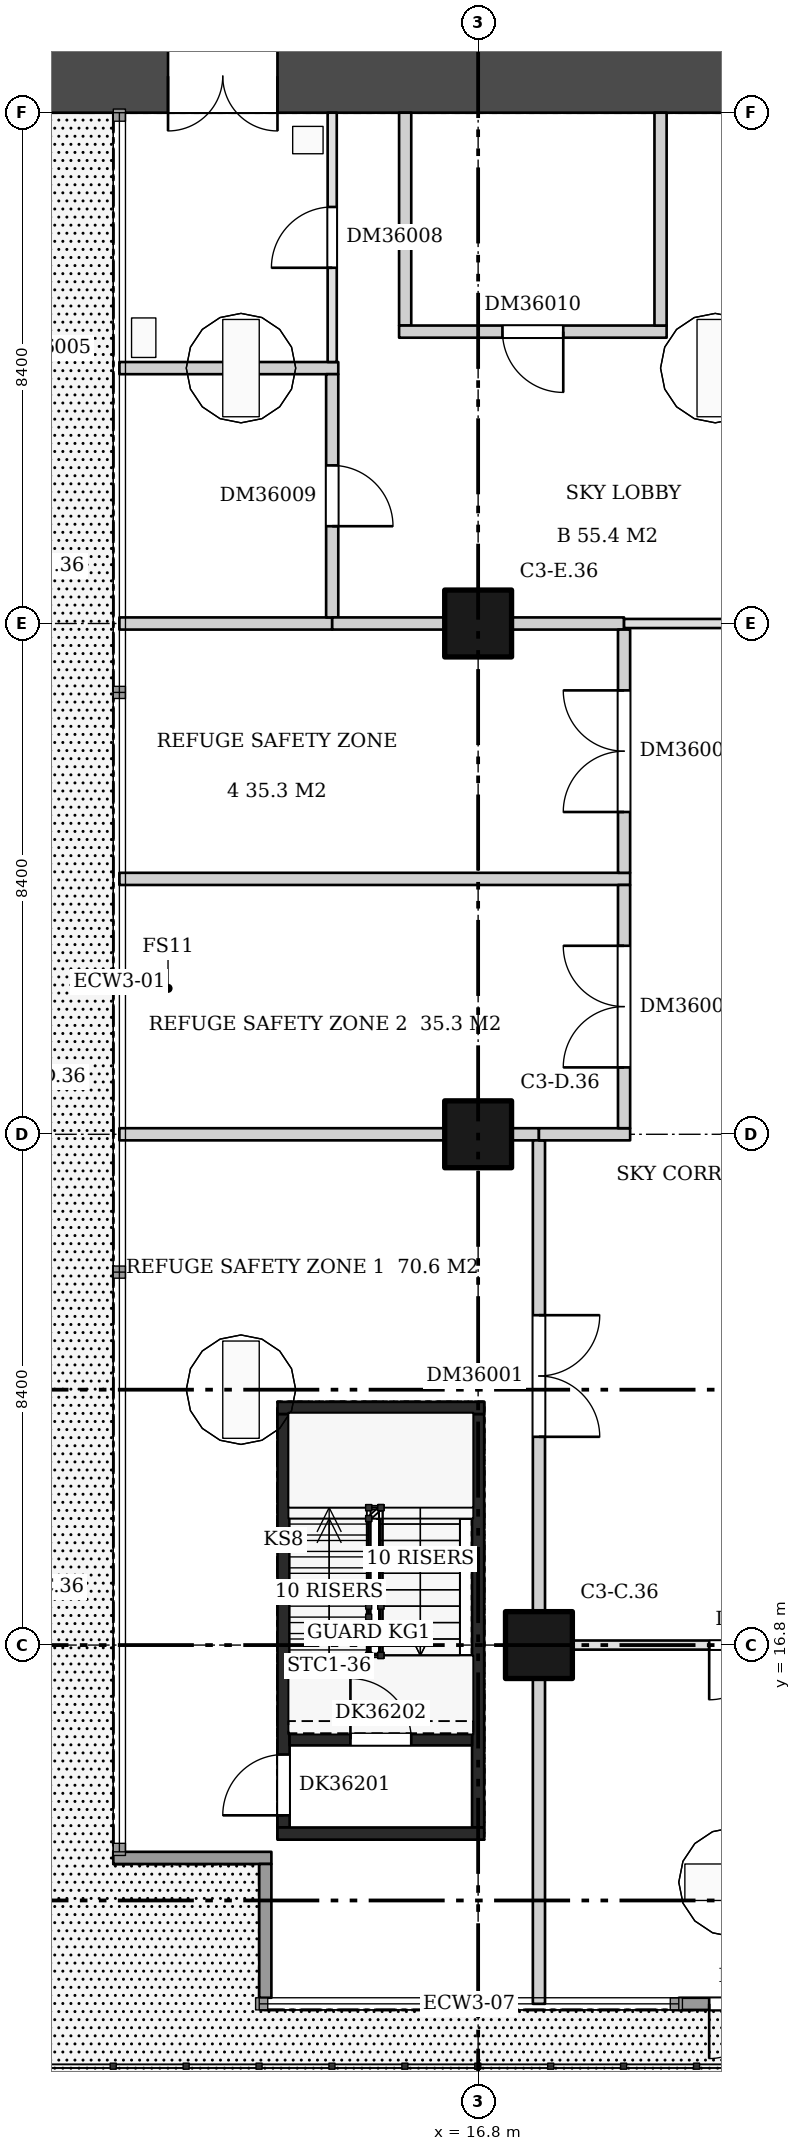
"""IFC4 building model, lengths in metres.
Left out: names, types, materials, properties, quantities, classifications, styles, units other than length and angle.
Written with IfcOpenShell. Run it as: python <this file> out.ifc"""

import sys

from ifc_helpers import new_model, si_unit, direction, frame, frame_2d, origin, origin_2d, place, context, subcontext, project, spatial, rectangle, extrude, element, fill, save


model = new_model("IFC4")
c1 = context("Model", 3, precision=1e-05, world=origin(), true_north=direction((0.0, 1.0)))
c2 = subcontext(c1, "Body", "Model", "MODEL_VIEW")
j1 = project(units=[si_unit("LENGTHUNIT", "METRE"), si_unit("PLANEANGLEUNIT", "RADIAN")], contexts=[c1])
p1 = place(None, origin())
s1 = spatial("IfcSite", under=j1, at=p1, CompositionType="ELEMENT")
p2 = place(p1, origin())
s2 = spatial("IfcBuilding", under=s1, at=p2, CompositionType="ELEMENT")
p3 = place(p2, frame((0.0, 0.0, 140.7)))
s3 = spatial("IfcBuildingStorey", under=s2, at=p3, CompositionType="ELEMENT", Elevation=140.7)
for number, where, z_axis, x_axis in (
    (1, (17.8, 16.8, 0.0), (0.0, 0.0, 1.0), (1.0, 0.0, 0.0)),
    (2, (16.8, 25.2, 0.0), (0.0, 0.0, 1.0), (1.0, 0.0, 0.0)),
    (3, (16.8, 33.6, 0.0), (0.0, 0.0, 1.0), (1.0, 0.0, 0.0)),
):
    element("IfcColumn", number, at=place(p3, frame(where, z_axis=z_axis, x_axis=x_axis)), inside=s3, PredefinedType="COLUMN", context=c2, shape_type="SweptSolid", body=[
        extrude(rectangle(XDim=1.1, YDim=1.1, at=origin_2d()), origin(), (0.0, 0.0, 1.0), 6.72),
    ])
p4 = place(p3, frame((9.6, 42.6, 0.0), z_axis=(0.0, 0.0, 1.0), x_axis=(1.0, 0.0, 0.0)))
e4 = element("IfcWall", 4, at=p4, inside=s3, PredefinedType="SHEAR", context=c2, shape_type="SweptSolid", body=[
    extrude(rectangle(XDim=14.4, YDim=1.2, at=frame_2d((7.2, 0.0))), origin(), (0.0, 0.0, 1.0), 6.72),
])
p5 = place(p4, frame((2.1, 0.0, 0.0)))
e5 = element("IfcOpeningElement", 5, at=p5, cuts=e4, PredefinedType="OPENING", context=c2, shape_type="SweptSolid", body=[
    extrude(rectangle(XDim=1.8, YDim=2.1, at=frame_2d((0.9, 1.05))), frame((0.0, 0.61, 0.0), z_axis=(0.0, -1.0, 0.0), x_axis=(1.0, 0.0, 0.0)), (0.0, 0.0, 1.0), 1.22),
])
p6 = place(p3, frame((13.6, 13.8, 0.0), z_axis=(0.0, 0.0, 1.0), x_axis=(0.0, 1.0, 0.0)))
e6 = element("IfcWall", 6, at=p6, inside=s3, PredefinedType="SHEAR", context=c2, shape_type="SweptSolid", body=[
    extrude(rectangle(XDim=6.8, YDim=0.2, at=frame_2d((3.4, 0.0))), origin(), (0.0, 0.0, 1.0), 6.72),
])
p7 = place(p6, frame((0.2, 0.0, 0.0)))
e7 = element("IfcOpeningElement", 7, at=p7, cuts=e6, PredefinedType="OPENING", context=c2, shape_type="SweptSolid", body=[
    extrude(rectangle(XDim=1.0, YDim=2.1, at=frame_2d((0.5, 1.05))), frame((0.0, 0.11, 0.0), z_axis=(0.0, -1.0, 0.0), x_axis=(1.0, 0.0, 0.0)), (0.0, 0.0, 1.0), 0.22),
])
p8 = place(p3, frame((16.8, 13.8, 0.0), z_axis=(0.0, 0.0, 1.0), x_axis=(0.0, 1.0, 0.0)))
e8 = element("IfcWall", 8, at=p8, inside=s3, PredefinedType="SHEAR", context=c2, shape_type="SweptSolid", body=[
    extrude(rectangle(XDim=6.8, YDim=0.2, at=frame_2d((3.4, 0.0))), origin(), (0.0, 0.0, 1.0), 6.72),
])
for number, where, z_axis, x_axis in (
    (9, (13.5, 13.7, 0.0), (0.0, 0.0, 1.0), (1.0, 0.0, 0.0)),
    (10, (13.5, 20.7, 0.0), (0.0, 0.0, 1.0), (1.0, 0.0, 0.0)),
):
    element("IfcWall", number, at=place(p3, frame(where, z_axis=z_axis, x_axis=x_axis)), inside=s3, PredefinedType="SHEAR", context=c2, shape_type="SweptSolid", body=[
        extrude(rectangle(XDim=3.4, YDim=0.2, at=frame_2d((1.7, 0.0))), origin(), (0.0, 0.0, 1.0), 6.72),
    ])
p9 = place(p3, frame((13.7, 15.25, 0.0), z_axis=(0.0, 0.0, 1.0), x_axis=(1.0, 0.0, 0.0)))
e11 = element("IfcWall", 11, at=p9, inside=s3, PredefinedType="SHEAR", context=c2, shape_type="SweptSolid", body=[
    extrude(rectangle(XDim=3.0, YDim=0.2, at=frame_2d((1.5, 0.0))), origin(), (0.0, 0.0, 1.0), 6.72),
])
p10 = place(p9, frame((1.0, 0.0, 0.0)))
e12 = element("IfcOpeningElement", 12, at=p10, cuts=e11, PredefinedType="OPENING", context=c2, shape_type="SweptSolid", body=[
    extrude(rectangle(XDim=1.0, YDim=2.1, at=frame_2d((0.5, 1.05))), frame((0.0, 0.11, 0.0), z_axis=(0.0, -1.0, 0.0), x_axis=(1.0, 0.0, 0.0)), (0.0, 0.0, 1.0), 0.22),
])
p11 = place(p3, frame((10.9, 25.2, 0.0), z_axis=(0.0, 0.0, 1.0), x_axis=(1.0, 0.0, 0.0)))
e13 = element("IfcWall", 13, at=p11, inside=s3, PredefinedType="PARTITIONING", context=c2, shape_type="SweptSolid", body=[
    extrude(rectangle(XDim=5.35, YDim=0.2, at=frame_2d((2.675, 0.0))), origin(), (0.0, 0.0, 1.0), 6.72),
])
p12 = place(p3, frame((17.35, 25.2, 0.0), z_axis=(0.0, 0.0, 1.0), x_axis=(1.0, 0.0, 0.0)))
e14 = element("IfcWall", 14, at=p12, inside=s3, PredefinedType="PARTITIONING", context=c2, shape_type="SweptSolid", body=[
    extrude(rectangle(XDim=0.45, YDim=0.2, at=frame_2d((0.225, 0.0))), origin(), (0.0, 0.0, 1.0), 6.72),
])
p13 = place(p3, frame((10.9, 29.4, 0.0), z_axis=(0.0, 0.0, 1.0), x_axis=(1.0, 0.0, 0.0)))
e15 = element("IfcWall", 15, at=p13, inside=s3, PredefinedType="PARTITIONING", context=c2, shape_type="SweptSolid", body=[
    extrude(rectangle(XDim=8.4, YDim=0.2, at=frame_2d((4.2, 0.0))), origin(), (0.0, 0.0, 1.0), 6.72),
])
p14 = place(p3, frame((10.9, 33.6, 0.0), z_axis=(0.0, 0.0, 1.0), x_axis=(1.0, 0.0, 0.0)))
e16 = element("IfcWall", 16, at=p14, inside=s3, PredefinedType="PARTITIONING", context=c2, shape_type="SweptSolid", body=[
    extrude(rectangle(XDim=3.5, YDim=0.2, at=frame_2d((1.75, 0.0))), origin(), (0.0, 0.0, 1.0), 6.72),
])
p15 = place(p3, frame((10.9, 37.8, 0.0), z_axis=(0.0, 0.0, 1.0), x_axis=(1.0, 0.0, 0.0)))
e17 = element("IfcWall", 17, at=p15, inside=s3, PredefinedType="PARTITIONING", context=c2, shape_type="SweptSolid", body=[
    extrude(rectangle(XDim=3.6, YDim=0.2, at=frame_2d((1.8, 0.0))), origin(), (0.0, 0.0, 1.0), 6.72),
])
p16 = place(p3, frame((14.4, 33.7, 0.0), z_axis=(0.0, 0.0, 1.0), x_axis=(0.0, 1.0, 0.0)))
e18 = element("IfcWall", 18, at=p16, inside=s3, PredefinedType="PARTITIONING", context=c2, shape_type="SweptSolid", body=[
    extrude(rectangle(XDim=4.0, YDim=0.2, at=frame_2d((2.0, 0.0))), origin(), (0.0, 0.0, 1.0), 6.72),
])
p17 = place(p16, frame((1.5, 0.0, 0.0)))
e19 = element("IfcOpeningElement", 19, at=p17, cuts=e18, PredefinedType="OPENING", context=c2, shape_type="SweptSolid", body=[
    extrude(rectangle(XDim=1.0, YDim=2.1, at=frame_2d((0.5, 1.05))), frame((0.0, 0.11, 0.0), z_axis=(0.0, -1.0, 0.0), x_axis=(1.0, 0.0, 0.0)), (0.0, 0.0, 1.0), 0.22),
])
p18 = place(p3, frame((14.4, 33.6, 0.0), z_axis=(0.0, 0.0, 1.0), x_axis=(1.0, 0.0, 0.0)))
e20 = element("IfcWall", 20, at=p18, inside=s3, PredefinedType="PARTITIONING", context=c2, shape_type="SweptSolid", body=[
    extrude(rectangle(XDim=1.85, YDim=0.2, at=frame_2d((0.925, 0.0))), origin(), (0.0, 0.0, 1.0), 6.72),
])
p19 = place(p3, frame((17.35, 33.6, 0.0), z_axis=(0.0, 0.0, 1.0), x_axis=(1.0, 0.0, 0.0)))
e21 = element("IfcWall", 21, at=p19, inside=s3, PredefinedType="PARTITIONING", context=c2, shape_type="SweptSolid", body=[
    extrude(rectangle(XDim=1.85, YDim=0.2, at=frame_2d((0.925, 0.0))), origin(), (0.0, 0.0, 1.0), 6.72),
])
p20 = place(p3, frame((14.4, 37.9, 0.0), z_axis=(0.0, 0.0, 1.0), x_axis=(0.0, 1.0, 0.0)))
e22 = element("IfcWall", 22, at=p20, inside=s3, PredefinedType="PARTITIONING", context=c2, shape_type="SweptSolid", body=[
    extrude(rectangle(XDim=4.1, YDim=0.15, at=frame_2d((2.05, 0.0))), origin(), (0.0, 0.0, 1.0), 6.72),
])
p21 = place(p20, frame((1.55, 0.0, 0.0)))
e23 = element("IfcOpeningElement", 23, at=p21, cuts=e22, PredefinedType="OPENING", context=c2, shape_type="SweptSolid", body=[
    extrude(rectangle(XDim=1.0, YDim=2.1, at=frame_2d((0.5, 1.05))), frame((0.0, 0.085, 0.0), z_axis=(0.0, -1.0, 0.0), x_axis=(1.0, 0.0, 0.0)), (0.0, 0.0, 1.0), 0.17),
])
p22 = place(p3, frame((15.6, 38.5, 0.0), z_axis=(0.0, 0.0, 1.0), x_axis=(0.0, 1.0, 0.0)))
e24 = element("IfcWall", 24, at=p22, inside=s3, PredefinedType="PARTITIONING", context=c2, shape_type="SweptSolid", body=[
    extrude(rectangle(XDim=3.5, YDim=0.2, at=frame_2d((1.75, 0.0))), origin(), (0.0, 0.0, 1.0), 6.72),
])
p23 = place(p3, frame((15.5, 38.4, 0.0), z_axis=(0.0, 0.0, 1.0), x_axis=(1.0, 0.0, 0.0)))
e25 = element("IfcWall", 25, at=p23, inside=s3, PredefinedType="PARTITIONING", context=c2, shape_type="SweptSolid", body=[
    extrude(rectangle(XDim=4.4, YDim=0.2, at=frame_2d((2.2, 0.0))), origin(), (0.0, 0.0, 1.0), 6.72),
])
p24 = place(p23, frame((1.7, 0.0, 0.0)))
e26 = element("IfcOpeningElement", 26, at=p24, cuts=e25, PredefinedType="OPENING", context=c2, shape_type="SweptSolid", body=[
    extrude(rectangle(XDim=1.0, YDim=2.1, at=frame_2d((0.5, 1.05))), frame((0.0, 0.11, 0.0), z_axis=(0.0, -1.0, 0.0), x_axis=(1.0, 0.0, 0.0)), (0.0, 0.0, 1.0), 0.22),
])
p25 = place(p3, frame((17.8, 10.9, 0.0), z_axis=(0.0, 0.0, 1.0), x_axis=(0.0, 1.0, 0.0)))
e27 = element("IfcWall", 27, at=p25, inside=s3, PredefinedType="PARTITIONING", context=c2, shape_type="SweptSolid", body=[
    extrude(rectangle(XDim=5.35, YDim=0.2, at=frame_2d((2.675, 0.0))), origin(), (0.0, 0.0, 1.0), 6.72),
])
p26 = place(p3, frame((17.8, 17.35, 0.0), z_axis=(0.0, 0.0, 1.0), x_axis=(0.0, 1.0, 0.0)))
e28 = element("IfcWall", 28, at=p26, inside=s3, PredefinedType="PARTITIONING", context=c2, shape_type="SweptSolid", body=[
    extrude(rectangle(XDim=7.75, YDim=0.2, at=frame_2d((3.875, 0.0))), origin(), (0.0, 0.0, 1.0), 6.72),
])
p27 = place(p26, frame((2.875, 0.0, 0.0)))
e29 = element("IfcOpeningElement", 29, at=p27, cuts=e28, PredefinedType="OPENING", context=c2, shape_type="SweptSolid", body=[
    extrude(rectangle(XDim=2.0, YDim=2.1, at=frame_2d((1.0, 1.05))), frame((0.0, 0.11, 0.0), z_axis=(0.0, -1.0, 0.0), x_axis=(1.0, 0.0, 0.0)), (0.0, 0.0, 1.0), 0.22),
])
p28 = place(p3, frame((18.35, 16.8, 0.0), z_axis=(0.0, 0.0, 1.0), x_axis=(1.0, 0.0, 0.0)))
e30 = element("IfcWall", 30, at=p28, inside=s3, PredefinedType="PARTITIONING", context=c2, shape_type="SweptSolid", body=[
    extrude(rectangle(XDim=6.3, YDim=0.15, at=frame_2d((3.15, 0.0))), origin(), (0.0, 0.0, 1.0), 6.72),
])
p29 = place(p28, frame((2.25, 0.0, 0.0)))
e31 = element("IfcOpeningElement", 31, at=p29, cuts=e30, PredefinedType="OPENING", context=c2, shape_type="SweptSolid", body=[
    extrude(rectangle(XDim=1.8, YDim=2.1, at=frame_2d((0.9, 1.05))), frame((0.0, 0.085, 0.0), z_axis=(0.0, -1.0, 0.0), x_axis=(1.0, 0.0, 0.0)), (0.0, 0.0, 1.0), 0.17),
])
p30 = place(p3, frame((17.8, 25.2, 0.0), z_axis=(0.0, 0.0, 1.0), x_axis=(1.0, 0.0, 0.0)))
e32 = element("IfcWall", 32, at=p30, inside=s3, PredefinedType="PARTITIONING", context=c2, shape_type="SweptSolid", body=[
    extrude(rectangle(XDim=1.5, YDim=0.2, at=frame_2d((0.75, 0.0))), origin(), (0.0, 0.0, 1.0), 6.72),
])
p31 = place(p3, frame((19.2, 25.3, 0.0), z_axis=(0.0, 0.0, 1.0), x_axis=(0.0, 1.0, 0.0)))
e33 = element("IfcWall", 33, at=p31, inside=s3, PredefinedType="PARTITIONING", context=c2, shape_type="SweptSolid", body=[
    extrude(rectangle(XDim=4.0, YDim=0.2, at=frame_2d((2.0, 0.0))), origin(), (0.0, 0.0, 1.0), 6.72),
])
p32 = place(p31, frame((1.0, 0.0, 0.0)))
e34 = element("IfcOpeningElement", 34, at=p32, cuts=e33, PredefinedType="OPENING", context=c2, shape_type="SweptSolid", body=[
    extrude(rectangle(XDim=2.0, YDim=2.1, at=frame_2d((1.0, 1.05))), frame((0.0, 0.11, 0.0), z_axis=(0.0, -1.0, 0.0), x_axis=(1.0, 0.0, 0.0)), (0.0, 0.0, 1.0), 0.22),
])
p33 = place(p3, frame((19.2, 29.5, 0.0), z_axis=(0.0, 0.0, 1.0), x_axis=(0.0, 1.0, 0.0)))
e35 = element("IfcWall", 35, at=p33, inside=s3, PredefinedType="PARTITIONING", context=c2, shape_type="SweptSolid", body=[
    extrude(rectangle(XDim=4.0, YDim=0.2, at=frame_2d((2.0, 0.0))), origin(), (0.0, 0.0, 1.0), 6.72),
])
p34 = place(p33, frame((1.0, 0.0, 0.0)))
e36 = element("IfcOpeningElement", 36, at=p34, cuts=e35, PredefinedType="OPENING", context=c2, shape_type="SweptSolid", body=[
    extrude(rectangle(XDim=2.0, YDim=2.1, at=frame_2d((1.0, 1.05))), frame((0.0, 0.11, 0.0), z_axis=(0.0, -1.0, 0.0), x_axis=(1.0, 0.0, 0.0)), (0.0, 0.0, 1.0), 0.22),
])
p35 = place(p3, frame((19.2, 33.6, 0.0), z_axis=(0.0, 0.0, 1.0), x_axis=(1.0, 0.0, 0.0)))
e37 = element("IfcWall", 37, at=p35, inside=s3, PredefinedType="PARTITIONING", context=c2, shape_type="SweptSolid", body=[
    extrude(rectangle(XDim=3.5, YDim=0.15, at=frame_2d((1.75, 0.0))), origin(), (0.0, 0.0, 1.0), 6.72),
])
p36 = place(p3, frame((19.8, 38.5, 0.0), z_axis=(0.0, 0.0, 1.0), x_axis=(0.0, 1.0, 0.0)))
e38 = element("IfcWall", 38, at=p36, inside=s3, PredefinedType="PARTITIONING", context=c2, shape_type="SweptSolid", body=[
    extrude(rectangle(XDim=3.5, YDim=0.2, at=frame_2d((1.75, 0.0))), origin(), (0.0, 0.0, 1.0), 6.72),
])
p37 = place(p3, frame((10.8, 13.3, 0.0), z_axis=(0.0, 0.0, 1.0), x_axis=(1.0, 0.0, 0.0)))
e39 = element("IfcWall", 39, at=p37, inside=s3, PredefinedType="SOLIDWALL", context=c2, shape_type="SweptSolid", body=[
    extrude(rectangle(XDim=2.6, YDim=0.2, at=frame_2d((1.3, 0.0))), origin(), (0.0, 0.0, 1.0), 6.72),
])
p38 = place(p3, frame((13.3, 13.2, 0.0), z_axis=(0.0, 0.0, 1.0), x_axis=(0.0, -1.0, 0.0)))
e40 = element("IfcWall", 40, at=p38, inside=s3, PredefinedType="SOLIDWALL", context=c2, shape_type="SweptSolid", body=[
    extrude(rectangle(XDim=2.2, YDim=0.2, at=frame_2d((1.1, 0.0))), origin(), (0.0, 0.0, 1.0), 6.72),
])
p39 = place(p3, frame((20.1, 10.9, 0.0), z_axis=(0.0, 0.0, 1.0), x_axis=(1.0, 0.0, 0.0)))
e41 = element("IfcWall", 41, at=p39, inside=s3, PredefinedType="SOLIDWALL", context=c2, shape_type="SweptSolid", body=[
    extrude(rectangle(XDim=2.8, YDim=0.2, at=frame_2d((1.4, 0.0))), origin(), (0.0, 0.0, 1.0), 6.72),
])
p40 = place(p39, frame((0.5, 0.0, 0.0)))
e42 = element("IfcOpeningElement", 42, at=p40, cuts=e41, PredefinedType="OPENING", context=c2, shape_type="SweptSolid", body=[
    extrude(rectangle(XDim=1.8, YDim=2.4, at=frame_2d((0.9, 1.2))), frame((0.0, 0.11, 0.0), z_axis=(0.0, -1.0, 0.0), x_axis=(1.0, 0.0, 0.0)), (0.0, 0.0, 1.0), 0.22),
])
p41 = place(p5, frame((1.8, 0.0, 0.0), z_axis=(0.0, 0.0, 1.0), x_axis=(-1.0, 0.0, 0.0)))
e43 = element("IfcDoor", 43, at=p41, inside=s3, OperationType="DOUBLE_DOOR_SINGLE_SWING", PredefinedType="DOOR", context=c2, shape_type="SweptSolid", body=[
    extrude(rectangle(XDim=1.8, YDim=2.1, at=frame_2d((0.9, 1.05))), frame((0.0, 0.025, 0.0), z_axis=(0.0, -1.0, 0.0), x_axis=(1.0, 0.0, 0.0)), (0.0, 0.0, 1.0), 0.05),
])
fill(e5, e43)
p42 = place(p7, origin())
e44 = element("IfcDoor", 44, at=p42, inside=s3, OperationType="SINGLE_SWING_LEFT", PredefinedType="DOOR", context=c2, shape_type="SweptSolid", body=[
    extrude(rectangle(XDim=1.0, YDim=2.1, at=frame_2d((0.5, 1.05))), frame((0.0, 0.025, 0.0), z_axis=(0.0, -1.0, 0.0), x_axis=(1.0, 0.0, 0.0)), (0.0, 0.0, 1.0), 0.05),
])
fill(e7, e44)
p43 = place(p10, origin())
e45 = element("IfcDoor", 45, at=p43, inside=s3, OperationType="SINGLE_SWING_LEFT", PredefinedType="DOOR", context=c2, shape_type="SweptSolid", body=[
    extrude(rectangle(XDim=1.0, YDim=2.1, at=frame_2d((0.5, 1.05))), frame((0.0, 0.025, 0.0), z_axis=(0.0, -1.0, 0.0), x_axis=(1.0, 0.0, 0.0)), (0.0, 0.0, 1.0), 0.05),
])
fill(e12, e45)
p44 = place(p27, frame((2.0, 0.0, 0.0), z_axis=(0.0, 0.0, 1.0), x_axis=(-1.0, 0.0, 0.0)))
e46 = element("IfcDoor", 46, at=p44, inside=s3, OperationType="DOUBLE_DOOR_SINGLE_SWING", PredefinedType="DOOR", context=c2, shape_type="SweptSolid", body=[
    extrude(rectangle(XDim=2.0, YDim=2.1, at=frame_2d((1.0, 1.05))), frame((0.0, 0.025, 0.0), z_axis=(0.0, -1.0, 0.0), x_axis=(1.0, 0.0, 0.0)), (0.0, 0.0, 1.0), 0.05),
])
fill(e29, e46)
p45 = place(p29, frame((1.8, 0.0, 0.0), z_axis=(0.0, 0.0, 1.0), x_axis=(-1.0, 0.0, 0.0)))
e47 = element("IfcDoor", 47, at=p45, inside=s3, OperationType="DOUBLE_DOOR_SINGLE_SWING", PredefinedType="DOOR", context=c2, shape_type="SweptSolid", body=[
    extrude(rectangle(XDim=1.8, YDim=2.1, at=frame_2d((0.9, 1.05))), frame((0.0, 0.025, 0.0), z_axis=(0.0, -1.0, 0.0), x_axis=(1.0, 0.0, 0.0)), (0.0, 0.0, 1.0), 0.05),
])
fill(e31, e47)
p46 = place(p32, origin())
e48 = element("IfcDoor", 48, at=p46, inside=s3, OperationType="DOUBLE_DOOR_SINGLE_SWING", PredefinedType="DOOR", context=c2, shape_type="SweptSolid", body=[
    extrude(rectangle(XDim=2.0, YDim=2.1, at=frame_2d((1.0, 1.05))), frame((0.0, 0.025, 0.0), z_axis=(0.0, -1.0, 0.0), x_axis=(1.0, 0.0, 0.0)), (0.0, 0.0, 1.0), 0.05),
])
fill(e34, e48)
p47 = place(p34, origin())
e49 = element("IfcDoor", 49, at=p47, inside=s3, OperationType="DOUBLE_DOOR_SINGLE_SWING", PredefinedType="DOOR", context=c2, shape_type="SweptSolid", body=[
    extrude(rectangle(XDim=2.0, YDim=2.1, at=frame_2d((1.0, 1.05))), frame((0.0, 0.025, 0.0), z_axis=(0.0, -1.0, 0.0), x_axis=(1.0, 0.0, 0.0)), (0.0, 0.0, 1.0), 0.05),
])
fill(e36, e49)
p48 = place(p21, origin())
e50 = element("IfcDoor", 50, at=p48, inside=s3, OperationType="SINGLE_SWING_LEFT", PredefinedType="DOOR", context=c2, shape_type="SweptSolid", body=[
    extrude(rectangle(XDim=1.0, YDim=2.1, at=frame_2d((0.5, 1.05))), frame((0.0, 0.025, 0.0), z_axis=(0.0, -1.0, 0.0), x_axis=(1.0, 0.0, 0.0)), (0.0, 0.0, 1.0), 0.05),
])
fill(e23, e50)
p49 = place(p17, frame((1.0, 0.0, 0.0), z_axis=(0.0, 0.0, 1.0), x_axis=(-1.0, 0.0, 0.0)))
e51 = element("IfcDoor", 51, at=p49, inside=s3, OperationType="SINGLE_SWING_RIGHT", PredefinedType="DOOR", context=c2, shape_type="SweptSolid", body=[
    extrude(rectangle(XDim=1.0, YDim=2.1, at=frame_2d((0.5, 1.05))), frame((0.0, 0.025, 0.0), z_axis=(0.0, -1.0, 0.0), x_axis=(1.0, 0.0, 0.0)), (0.0, 0.0, 1.0), 0.05),
])
fill(e19, e51)
p50 = place(p24, frame((1.0, 0.0, 0.0), z_axis=(0.0, 0.0, 1.0), x_axis=(-1.0, 0.0, 0.0)))
e52 = element("IfcDoor", 52, at=p50, inside=s3, OperationType="SINGLE_SWING_LEFT", PredefinedType="DOOR", context=c2, shape_type="SweptSolid", body=[
    extrude(rectangle(XDim=1.0, YDim=2.1, at=frame_2d((0.5, 1.05))), frame((0.0, 0.025, 0.0), z_axis=(0.0, -1.0, 0.0), x_axis=(1.0, 0.0, 0.0)), (0.0, 0.0, 1.0), 0.05),
])
fill(e26, e52)
p51 = place(p40, frame((1.8, 0.0, 0.0), z_axis=(0.0, 0.0, 1.0), x_axis=(-1.0, 0.0, 0.0)))
e53 = element("IfcDoor", 53, at=p51, inside=s3, OperationType="DOUBLE_DOOR_SINGLE_SWING", PredefinedType="DOOR", context=c2, shape_type="SweptSolid", body=[
    extrude(rectangle(XDim=1.8, YDim=2.4, at=frame_2d((0.9, 1.2))), frame((0.0, 0.025, 0.0), z_axis=(0.0, -1.0, 0.0), x_axis=(1.0, 0.0, 0.0)), (0.0, 0.0, 1.0), 0.05),
])
fill(e42, e53)
save(model, sys.argv[1])
